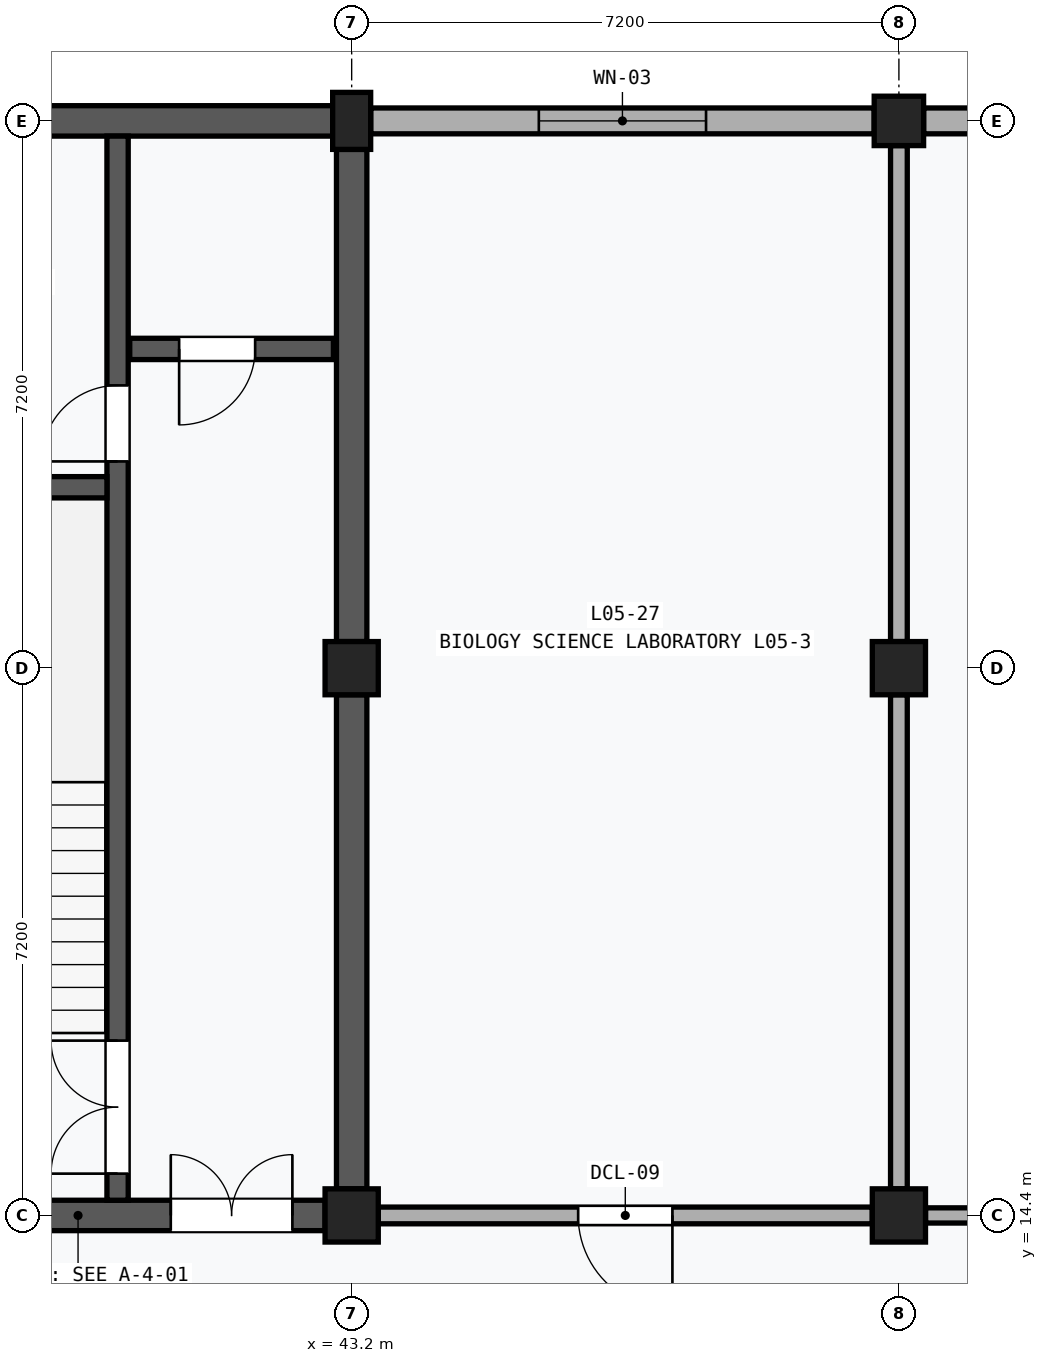
"""IFC4 building model, lengths in metres.
Left out: names, types, materials, properties, quantities, classifications, styles, units other than length and angle.
Written with IfcOpenShell. Run it as: python <this file> out.ifc"""

import sys

from ifc_helpers import new_model, si_unit, direction, frame, frame_2d, origin, origin_2d, place, context, subcontext, project, spatial, rectangle, extrude, element, fill, save


model = new_model("IFC4")
c1 = context("Model", 3, precision=1e-05, world=origin(), true_north=direction((0.0, 1.0)))
c2 = subcontext(c1, "Body", "Model", "MODEL_VIEW")
j1 = project(units=[si_unit("LENGTHUNIT", "METRE"), si_unit("PLANEANGLEUNIT", "RADIAN")], contexts=[c1])
p1 = place(None, origin())
s1 = spatial("IfcSite", under=j1, at=p1, CompositionType="ELEMENT")
p2 = place(p1, origin())
s2 = spatial("IfcBuilding", under=s1, at=p2, CompositionType="ELEMENT")
p3 = place(p2, frame((0.0, 0.0, 22.6)))
s3 = spatial("IfcBuildingStorey", under=s2, at=p3, CompositionType="ELEMENT", Elevation=22.6)
for number, where, z_axis, x_axis in (
    (1, (43.2, 14.4, 0.0), (0.0, 0.0, 1.0), (1.0, 0.0, 0.0)),
    (2, (43.2, 21.6, 0.0), (0.0, 0.0, 1.0), (1.0, 0.0, 0.0)),
):
    element("IfcColumn", number, at=place(p3, frame(where, z_axis=z_axis, x_axis=x_axis)), inside=s3, PredefinedType="COLUMN", context=c2, shape_type="SweptSolid", body=[
        extrude(rectangle(XDim=0.7, YDim=0.7, at=origin_2d()), origin(), (0.0, 0.0, 1.0), 4.0),
    ])
p4 = place(p3, frame((43.2, 28.8, 0.0), z_axis=(0.0, 0.0, 1.0), x_axis=(1.0, 0.0, 0.0)))
e3 = element("IfcColumn", 3, at=p4, inside=s3, PredefinedType="PILASTER", context=c2, shape_type="SweptSolid", body=[
    extrude(rectangle(XDim=0.5, YDim=0.75, at=origin_2d()), origin(), (0.0, 0.0, 1.0), 4.0),
])
for number, where, z_axis, x_axis in (
    (4, (50.4, 14.4, 0.0), (0.0, 0.0, 1.0), (1.0, 0.0, 0.0)),
    (5, (50.4, 21.6, 0.0), (0.0, 0.0, 1.0), (1.0, 0.0, 0.0)),
):
    element("IfcColumn", number, at=place(p3, frame(where, z_axis=z_axis, x_axis=x_axis)), inside=s3, PredefinedType="COLUMN", context=c2, shape_type="SweptSolid", body=[
        extrude(rectangle(XDim=0.7, YDim=0.7, at=origin_2d()), origin(), (0.0, 0.0, 1.0), 4.0),
    ])
p5 = place(p3, frame((50.4, 28.8, 0.0), z_axis=(0.0, 0.0, 1.0), x_axis=(1.0, 0.0, 0.0)))
e6 = element("IfcColumn", 6, at=p5, inside=s3, PredefinedType="COLUMN", context=c2, shape_type="SweptSolid", body=[
    extrude(rectangle(XDim=0.65, YDim=0.65, at=origin_2d()), origin(), (0.0, 0.0, 1.0), 4.0),
])
p6 = place(p3, frame((43.45, 28.8, 0.0), z_axis=(0.0, 0.0, 1.0), x_axis=(1.0, 0.0, 0.0)))
e7 = element("IfcWall", 7, at=p6, inside=s3, PredefinedType="SOLIDWALL", context=c2, shape_type="SweptSolid", body=[
    extrude(rectangle(XDim=6.625, YDim=0.34, at=frame_2d((3.312, 0.0))), origin(), (0.0, 0.0, 1.0), 3.12),
])
p7 = place(p6, frame((2.212, 0.0, 0.9)))
e8 = element("IfcOpeningElement", 8, at=p7, cuts=e7, PredefinedType="OPENING", context=c2, shape_type="SweptSolid", body=[
    extrude(rectangle(XDim=2.2, YDim=1.8, at=frame_2d((1.1, 0.9))), frame((0.0, 0.182, 0.0), z_axis=(0.0, -1.0, 0.0), x_axis=(1.0, 0.0, 0.0)), (0.0, 0.0, 1.0), 0.364),
])
p8 = place(p3, frame((50.725, 28.8, 0.0), z_axis=(0.0, 0.0, 1.0), x_axis=(1.0, 0.0, 0.0)))
e9 = element("IfcWall", 9, at=p8, inside=s3, PredefinedType="SOLIDWALL", context=c2, shape_type="SweptSolid", body=[
    extrude(rectangle(XDim=6.55, YDim=0.34, at=frame_2d((3.275, 0.0))), origin(), (0.0, 0.0, 1.0), 3.12),
])
p9 = place(p8, frame((2.075, 0.0, 0.9)))
e10 = element("IfcOpeningElement", 10, at=p9, cuts=e9, PredefinedType="OPENING", context=c2, shape_type="SweptSolid", body=[
    extrude(rectangle(XDim=2.4, YDim=1.8, at=frame_2d((1.2, 0.9))), frame((0.0, 0.182, 0.0), z_axis=(0.0, -1.0, 0.0), x_axis=(1.0, 0.0, 0.0)), (0.0, 0.0, 1.0), 0.364),
])
p10 = place(p3, frame((43.2, 14.75, 0.0), z_axis=(0.0, 0.0, 1.0), x_axis=(0.0, 1.0, 0.0)))
e11 = element("IfcWall", 11, at=p10, inside=s3, PredefinedType="SHEAR", context=c2, shape_type="SweptSolid", body=[
    extrude(rectangle(XDim=6.5, YDim=0.4, at=frame_2d((3.25, 0.0))), origin(), (0.0, 0.0, 1.0), 2.98),
])
p11 = place(p3, frame((43.2, 21.95, 0.0), z_axis=(0.0, 0.0, 1.0), x_axis=(0.0, 1.0, 0.0)))
e12 = element("IfcWall", 12, at=p11, inside=s3, PredefinedType="SHEAR", context=c2, shape_type="SweptSolid", body=[
    extrude(rectangle(XDim=6.475, YDim=0.4, at=frame_2d((3.238, 0.0))), origin(), (0.0, 0.0, 1.0), 2.98),
])
p12 = place(p3, frame((36.35, 14.4, 0.0), z_axis=(0.0, 0.0, 1.0), x_axis=(1.0, 0.0, 0.0)))
e13 = element("IfcWall", 13, at=p12, inside=s3, PredefinedType="SHEAR", context=c2, shape_type="SweptSolid", body=[
    extrude(rectangle(XDim=6.5, YDim=0.4, at=frame_2d((3.25, 0.0))), origin(), (0.0, 0.0, 1.0), 2.98),
])
p13 = place(p12, frame((4.47, 0.0, 0.0)))
e14 = element("IfcOpeningElement", 14, at=p13, cuts=e13, PredefinedType="OPENING", context=c2, shape_type="SweptSolid", body=[
    extrude(rectangle(XDim=1.6, YDim=2.2, at=frame_2d((0.8, 1.1))), frame((0.0, 0.212, 0.0), z_axis=(0.0, -1.0, 0.0), x_axis=(1.0, 0.0, 0.0)), (0.0, 0.0, 1.0), 0.424),
])
p14 = place(p3, frame((36.325, 28.8, 0.0), z_axis=(0.0, 0.0, 1.0), x_axis=(1.0, 0.0, 0.0)))
e15 = element("IfcWall", 15, at=p14, inside=s3, PredefinedType="SHEAR", context=c2, shape_type="SweptSolid", body=[
    extrude(rectangle(XDim=6.625, YDim=0.4, at=frame_2d((3.312, 0.0))), origin(), (0.0, 0.0, 1.0), 3.12),
])
p15 = place(p3, frame((40.12, 14.6, 0.0), z_axis=(0.0, 0.0, 1.0), x_axis=(0.0, 1.0, 0.0)))
e16 = element("IfcWall", 16, at=p15, inside=s3, PredefinedType="SHEAR", context=c2, shape_type="SweptSolid", body=[
    extrude(rectangle(XDim=14.0, YDim=0.28, at=frame_2d((7.0, 0.0))), origin(), (0.0, 0.0, 1.0), 3.75),
])
p16 = place(p15, frame((0.35, 0.0, 0.0)))
e17 = element("IfcOpeningElement", 17, at=p16, cuts=e16, PredefinedType="OPENING", context=c2, shape_type="SweptSolid", body=[
    extrude(rectangle(XDim=1.75, YDim=2.15, at=frame_2d((0.875, 1.075))), frame((0.0, 0.152, 0.0), z_axis=(0.0, -1.0, 0.0), x_axis=(1.0, 0.0, 0.0)), (0.0, 0.0, 1.0), 0.304),
])
p17 = place(p15, frame((9.72, 0.0, 0.0)))
e18 = element("IfcOpeningElement", 18, at=p17, cuts=e16, PredefinedType="OPENING", context=c2, shape_type="SweptSolid", body=[
    extrude(rectangle(XDim=1.0, YDim=2.15, at=frame_2d((0.5, 1.075))), frame((0.0, 0.152, 0.0), z_axis=(0.0, -1.0, 0.0), x_axis=(1.0, 0.0, 0.0)), (0.0, 0.0, 1.0), 0.304),
])
p18 = place(p3, frame((36.2, 23.98, 0.0), z_axis=(0.0, 0.0, 1.0), x_axis=(1.0, 0.0, 0.0)))
e19 = element("IfcWall", 19, at=p18, inside=s3, PredefinedType="SHEAR", context=c2, shape_type="SweptSolid", body=[
    extrude(rectangle(XDim=3.78, YDim=0.28, at=frame_2d((1.89, 0.0))), origin(), (0.0, 0.0, 1.0), 3.75),
])
p19 = place(p3, frame((40.28, 25.8, 0.0), z_axis=(0.0, 0.0, 1.0), x_axis=(1.0, 0.0, 0.0)))
e20 = element("IfcWall", 20, at=p19, inside=s3, PredefinedType="SHEAR", context=c2, shape_type="SweptSolid", body=[
    extrude(rectangle(XDim=2.68, YDim=0.28, at=frame_2d((1.34, 0.0))), origin(), (0.0, 0.0, 1.0), 3.75),
])
p20 = place(p19, frame((0.65, 0.0, 0.0)))
e21 = element("IfcOpeningElement", 21, at=p20, cuts=e20, PredefinedType="OPENING", context=c2, shape_type="SweptSolid", body=[
    extrude(rectangle(XDim=1.0, YDim=2.15, at=frame_2d((0.5, 1.075))), frame((0.0, 0.152, 0.0), z_axis=(0.0, -1.0, 0.0), x_axis=(1.0, 0.0, 0.0)), (0.0, 0.0, 1.0), 0.304),
])
p21 = place(p3, frame((43.55, 14.4, 0.0), z_axis=(0.0, 0.0, 1.0), x_axis=(1.0, 0.0, 0.0)))
e22 = element("IfcWall", 22, at=p21, inside=s3, PredefinedType="PARTITIONING", context=c2, shape_type="SweptSolid", body=[
    extrude(rectangle(XDim=6.5, YDim=0.22, at=frame_2d((3.25, 0.0))), origin(), (0.0, 0.0, 1.0), 3.05),
])
p22 = place(p21, frame((2.63, 0.0, 0.0)))
e23 = element("IfcOpeningElement", 23, at=p22, cuts=e22, PredefinedType="OPENING", context=c2, shape_type="SweptSolid", body=[
    extrude(rectangle(XDim=1.24, YDim=2.26, at=frame_2d((0.62, 1.13))), frame((0.0, 0.122, 0.0), z_axis=(0.0, -1.0, 0.0), x_axis=(1.0, 0.0, 0.0)), (0.0, 0.0, 1.0), 0.244),
])
p23 = place(p3, frame((50.4, 14.75, 0.0), z_axis=(0.0, 0.0, 1.0), x_axis=(0.0, 1.0, 0.0)))
e24 = element("IfcWall", 24, at=p23, inside=s3, PredefinedType="PARTITIONING", context=c2, shape_type="SweptSolid", body=[
    extrude(rectangle(XDim=6.5, YDim=0.22, at=frame_2d((3.25, 0.0))), origin(), (0.0, 0.0, 1.0), 2.98),
])
p24 = place(p3, frame((50.4, 21.95, 0.0), z_axis=(0.0, 0.0, 1.0), x_axis=(0.0, 1.0, 0.0)))
e25 = element("IfcWall", 25, at=p24, inside=s3, PredefinedType="PARTITIONING", context=c2, shape_type="SweptSolid", body=[
    extrude(rectangle(XDim=6.525, YDim=0.22, at=frame_2d((3.263, 0.0))), origin(), (0.0, 0.0, 1.0), 2.98),
])
p25 = place(p3, frame((50.75, 14.4, 0.0), z_axis=(0.0, 0.0, 1.0), x_axis=(1.0, 0.0, 0.0)))
e26 = element("IfcWall", 26, at=p25, inside=s3, PredefinedType="PARTITIONING", context=c2, shape_type="SweptSolid", body=[
    extrude(rectangle(XDim=6.5, YDim=0.2, at=frame_2d((3.25, 0.0))), origin(), (0.0, 0.0, 1.0), 2.98),
])
p26 = place(p25, frame((2.61, 0.0, 0.0)))
e27 = element("IfcOpeningElement", 27, at=p26, cuts=e26, PredefinedType="OPENING", context=c2, shape_type="SweptSolid", body=[
    extrude(rectangle(XDim=1.28, YDim=2.28, at=frame_2d((0.64, 1.14))), frame((0.0, 0.112, 0.0), z_axis=(0.0, -1.0, 0.0), x_axis=(1.0, 0.0, 0.0)), (0.0, 0.0, 1.0), 0.224),
])
p27 = place(p7, origin())
e28 = element("IfcWindow", 28, at=p27, inside=s3, PartitioningType="SINGLE_PANEL", PredefinedType="WINDOW", context=c2, shape_type="SweptSolid", body=[
    extrude(rectangle(XDim=2.2, YDim=1.8, at=frame_2d((1.1, 0.9))), frame((0.0, 0.03, 0.0), z_axis=(0.0, -1.0, 0.0), x_axis=(1.0, 0.0, 0.0)), (0.0, 0.0, 1.0), 0.06),
])
fill(e8, e28)
p28 = place(p13, origin())
e29 = element("IfcDoor", 29, at=p28, inside=s3, OperationType="DOUBLE_DOOR_SINGLE_SWING", PredefinedType="DOOR", context=c2, shape_type="SweptSolid", body=[
    extrude(rectangle(XDim=1.6, YDim=2.2, at=frame_2d((0.8, 1.1))), frame((0.0, 0.025, 0.0), z_axis=(0.0, -1.0, 0.0), x_axis=(1.0, 0.0, 0.0)), (0.0, 0.0, 1.0), 0.05),
])
fill(e14, e29)
p29 = place(p16, origin())
e30 = element("IfcDoor", 30, at=p29, inside=s3, OperationType="DOUBLE_DOOR_SINGLE_SWING", PredefinedType="DOOR", context=c2, shape_type="SweptSolid", body=[
    extrude(rectangle(XDim=1.75, YDim=2.15, at=frame_2d((0.875, 1.075))), frame((0.0, 0.025, 0.0), z_axis=(0.0, -1.0, 0.0), x_axis=(1.0, 0.0, 0.0)), (0.0, 0.0, 1.0), 0.05),
])
fill(e17, e30)
p30 = place(p17, origin())
e31 = element("IfcDoor", 31, at=p30, inside=s3, OperationType="SINGLE_SWING_LEFT", PredefinedType="DOOR", context=c2, shape_type="SweptSolid", body=[
    extrude(rectangle(XDim=1.0, YDim=2.15, at=frame_2d((0.5, 1.075))), frame((0.0, 0.025, 0.0), z_axis=(0.0, -1.0, 0.0), x_axis=(1.0, 0.0, 0.0)), (0.0, 0.0, 1.0), 0.05),
])
fill(e18, e31)
p31 = place(p20, frame((1.0, 0.0, 0.0), z_axis=(0.0, 0.0, 1.0), x_axis=(-1.0, 0.0, 0.0)))
e32 = element("IfcDoor", 32, at=p31, inside=s3, OperationType="SINGLE_SWING_RIGHT", PredefinedType="DOOR", context=c2, shape_type="SweptSolid", body=[
    extrude(rectangle(XDim=1.0, YDim=2.15, at=frame_2d((0.5, 1.075))), frame((0.0, 0.025, 0.0), z_axis=(0.0, -1.0, 0.0), x_axis=(1.0, 0.0, 0.0)), (0.0, 0.0, 1.0), 0.05),
])
fill(e21, e32)
p32 = place(p22, frame((1.24, 0.0, 0.0), z_axis=(0.0, 0.0, 1.0), x_axis=(-1.0, 0.0, 0.0)))
e33 = element("IfcDoor", 33, at=p32, inside=s3, OperationType="SINGLE_SWING_LEFT", PredefinedType="DOOR", context=c2, shape_type="SweptSolid", body=[
    extrude(rectangle(XDim=1.24, YDim=2.26, at=frame_2d((0.62, 1.13))), frame((0.0, 0.025, 0.0), z_axis=(0.0, -1.0, 0.0), x_axis=(1.0, 0.0, 0.0)), (0.0, 0.0, 1.0), 0.05),
])
fill(e23, e33)
save(model, sys.argv[1])
